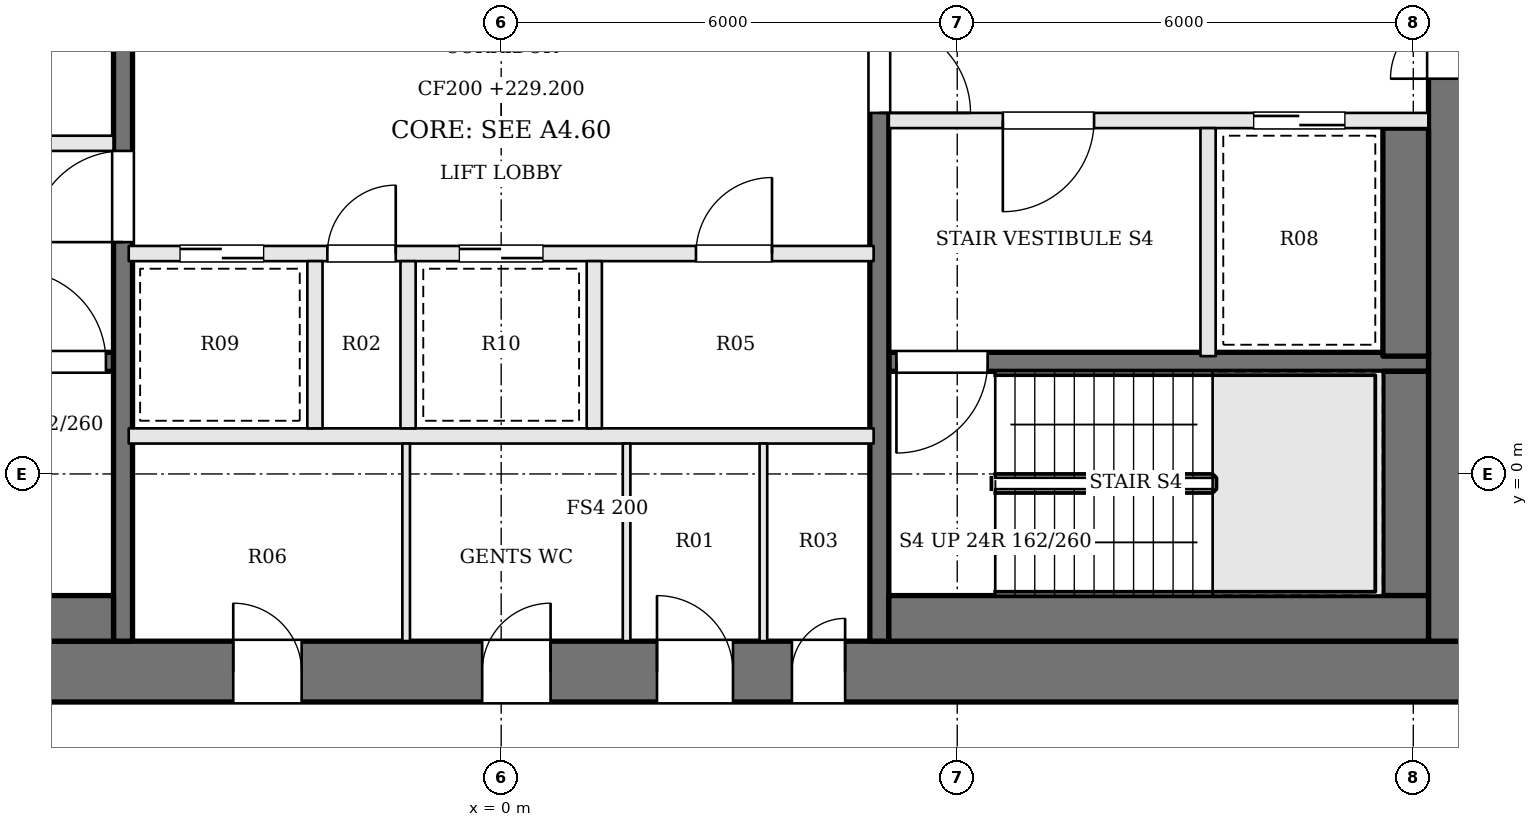
"""IFC4 building model, lengths in metres.
Left out: names, types, materials, properties, quantities, classifications, styles, units other than length and angle.
Written with IfcOpenShell. Run it as: python <this file> out.ifc"""

import sys

from ifc_helpers import new_model, si_unit, direction, frame, frame_2d, origin, place, context, subcontext, project, spatial, rectangle, extrude, element, fill, save


model = new_model("IFC4")
c1 = context("Model", 3, precision=1e-05, world=origin(), true_north=direction((0.0, 1.0)))
c2 = subcontext(c1, "Body", "Model", "MODEL_VIEW")
j1 = project(units=[si_unit("LENGTHUNIT", "METRE"), si_unit("PLANEANGLEUNIT", "RADIAN")], contexts=[c1])
p1 = place(None, origin())
s1 = spatial("IfcSite", under=j1, at=p1, CompositionType="ELEMENT")
p2 = place(p1, origin())
s2 = spatial("IfcBuilding", under=s1, at=p2, CompositionType="ELEMENT")
p3 = place(p2, frame((0.0, 0.0, 229.2)))
s3 = spatial("IfcBuildingStorey", under=s2, at=p3, CompositionType="ELEMENT", Elevation=229.2)
p4 = place(p3, frame((-13.0, -2.6, 0.0), z_axis=(0.0, 0.0, 1.0), x_axis=(1.0, 0.0, 0.0)))
e1 = element("IfcWall", 1, at=p4, inside=s3, PredefinedType="SHEAR", context=c2, shape_type="SweptSolid", body=[
    extrude(rectangle(XDim=26.0, YDim=0.8, at=frame_2d((13.0, 0.0))), origin(), (0.0, 0.0, 1.0), 3.9),
])
p5 = place(p4, frame((9.475, 0.0, 0.0)))
e2 = element("IfcOpeningElement", 2, at=p5, cuts=e1, PredefinedType="OPENING", context=c2, shape_type="SweptSolid", body=[
    extrude(rectangle(XDim=0.9, YDim=2.1, at=frame_2d((0.45, 1.05))), frame((0.0, 0.41, 0.0), z_axis=(0.0, -1.0, 0.0), x_axis=(1.0, 0.0, 0.0)), (0.0, 0.0, 1.0), 0.82),
])
p6 = place(p4, frame((12.75, 0.0, 0.0)))
e3 = element("IfcOpeningElement", 3, at=p6, cuts=e1, PredefinedType="OPENING", context=c2, shape_type="SweptSolid", body=[
    extrude(rectangle(XDim=0.9, YDim=2.1, at=frame_2d((0.45, 1.05))), frame((0.0, 0.41, 0.0), z_axis=(0.0, -1.0, 0.0), x_axis=(1.0, 0.0, 0.0)), (0.0, 0.0, 1.0), 0.82),
])
p7 = place(p4, frame((15.05, 0.0, 0.0)))
e4 = element("IfcOpeningElement", 4, at=p7, cuts=e1, PredefinedType="OPENING", context=c2, shape_type="SweptSolid", body=[
    extrude(rectangle(XDim=1.0, YDim=2.1, at=frame_2d((0.5, 1.05))), frame((0.0, 0.41, 0.0), z_axis=(0.0, -1.0, 0.0), x_axis=(1.0, 0.0, 0.0)), (0.0, 0.0, 1.0), 0.82),
])
p8 = place(p4, frame((16.825, 0.0, 0.0)))
e5 = element("IfcOpeningElement", 5, at=p8, cuts=e1, PredefinedType="OPENING", context=c2, shape_type="SweptSolid", body=[
    extrude(rectangle(XDim=0.7, YDim=2.1, at=frame_2d((0.35, 1.05))), frame((0.0, 0.41, 0.0), z_axis=(0.0, -1.0, 0.0), x_axis=(1.0, 0.0, 0.0)), (0.0, 0.0, 1.0), 0.82),
])
p9 = place(p3, frame((12.6, -2.2, 0.0), z_axis=(0.0, 0.0, 1.0), x_axis=(0.0, 1.0, 0.0)))
e6 = element("IfcWall", 6, at=p9, inside=s3, PredefinedType="SHEAR", context=c2, shape_type="SweptSolid", body=[
    extrude(rectangle(XDim=13.4, YDim=0.8, at=frame_2d((6.7, 0.0))), origin(), (0.0, 0.0, 1.0), 3.9),
])
p10 = place(p9, frame((7.4, 0.0, 0.0)))
e7 = element("IfcOpeningElement", 7, at=p10, cuts=e6, PredefinedType="OPENING", context=c2, shape_type="SweptSolid", body=[
    extrude(rectangle(XDim=1.8, YDim=2.1, at=frame_2d((0.9, 1.05))), frame((0.0, 0.41, 0.0), z_axis=(0.0, -1.0, 0.0), x_axis=(1.0, 0.0, 0.0)), (0.0, 0.0, 1.0), 0.82),
])
p11 = place(p3, frame((-12.2, 1.475, 0.0), z_axis=(0.0, 0.0, 1.0), x_axis=(1.0, 0.0, 0.0)))
e8 = element("IfcWall", 8, at=p11, inside=s3, PredefinedType="SOLIDWALL", context=c2, shape_type="SweptSolid", body=[
    extrude(rectangle(XDim=7.1, YDim=0.25, at=frame_2d((3.55, 0.0))), origin(), (0.0, 0.0, 1.0), 3.7),
])
p12 = place(p11, frame((5.8, 0.0, 0.0)))
e9 = element("IfcOpeningElement", 9, at=p12, cuts=e8, PredefinedType="OPENING", context=c2, shape_type="SweptSolid", body=[
    extrude(rectangle(XDim=1.2, YDim=2.1, at=frame_2d((0.6, 1.05))), frame((0.0, 0.135, 0.0), z_axis=(0.0, -1.0, 0.0), x_axis=(1.0, 0.0, 0.0)), (0.0, 0.0, 1.0), 0.27),
])
p13 = place(p3, frame((-12.2, 4.35, 0.0), z_axis=(0.0, 0.0, 1.0), x_axis=(1.0, 0.0, 0.0)))
e10 = element("IfcWall", 10, at=p13, inside=s3, PredefinedType="SOLIDWALL", context=c2, shape_type="SweptSolid", body=[
    extrude(rectangle(XDim=7.1, YDim=0.2, at=frame_2d((3.55, 0.0))), origin(), (0.0, 0.0, 1.0), 3.7),
])
p14 = place(p13, frame((4.4, 0.0, 0.0)))
e11 = element("IfcOpeningElement", 11, at=p14, cuts=e10, PredefinedType="OPENING", context=c2, shape_type="SweptSolid", body=[
    extrude(rectangle(XDim=1.2, YDim=2.1, at=frame_2d((0.6, 1.05))), frame((0.0, 0.11, 0.0), z_axis=(0.0, -1.0, 0.0), x_axis=(1.0, 0.0, 0.0)), (0.0, 0.0, 1.0), 0.22),
])
p15 = place(p13, frame((1.1, 0.0, 0.0)))
e12 = element("IfcOpeningElement", 12, at=p15, cuts=e10, PredefinedType="OPENING", context=c2, shape_type="SweptSolid", body=[
    extrude(rectangle(XDim=1.2, YDim=2.1, at=frame_2d((0.6, 1.05))), frame((0.0, 0.11, 0.0), z_axis=(0.0, -1.0, 0.0), x_axis=(1.0, 0.0, 0.0)), (0.0, 0.0, 1.0), 0.22),
])
p16 = place(p3, frame((12.2, 4.65, 0.0), z_axis=(0.0, 0.0, 1.0), x_axis=(-1.0, 0.0, 0.0)))
e13 = element("IfcWall", 13, at=p16, inside=s3, PredefinedType="SOLIDWALL", context=c2, shape_type="SweptSolid", body=[
    extrude(rectangle(XDim=7.1, YDim=0.2, at=frame_2d((3.55, 0.0))), origin(), (0.0, 0.0, 1.0), 3.7),
])
p17 = place(p16, frame((4.4, 0.0, 0.0)))
e14 = element("IfcOpeningElement", 14, at=p17, cuts=e13, PredefinedType="OPENING", context=c2, shape_type="SweptSolid", body=[
    extrude(rectangle(XDim=1.2, YDim=2.1, at=frame_2d((0.6, 1.05))), frame((0.0, 0.11, 0.0), z_axis=(0.0, -1.0, 0.0), x_axis=(1.0, 0.0, 0.0)), (0.0, 0.0, 1.0), 0.22),
])
p18 = place(p16, frame((1.1, 0.0, 0.0)))
e15 = element("IfcOpeningElement", 15, at=p18, cuts=e13, PredefinedType="OPENING", context=c2, shape_type="SweptSolid", body=[
    extrude(rectangle(XDim=1.2, YDim=2.1, at=frame_2d((0.6, 1.05))), frame((0.0, 0.11, 0.0), z_axis=(0.0, -1.0, 0.0), x_axis=(1.0, 0.0, 0.0)), (0.0, 0.0, 1.0), 0.22),
])
p19 = place(p3, frame((12.2, 1.475, 0.0), z_axis=(0.0, 0.0, 1.0), x_axis=(-1.0, 0.0, 0.0)))
e16 = element("IfcWall", 16, at=p19, inside=s3, PredefinedType="SOLIDWALL", context=c2, shape_type="SweptSolid", body=[
    extrude(rectangle(XDim=7.1, YDim=0.25, at=frame_2d((3.55, 0.0))), origin(), (0.0, 0.0, 1.0), 3.7),
])
p20 = place(p19, frame((5.8, 0.0, 0.0)))
e17 = element("IfcOpeningElement", 17, at=p20, cuts=e16, PredefinedType="OPENING", context=c2, shape_type="SweptSolid", body=[
    extrude(rectangle(XDim=1.2, YDim=2.1, at=frame_2d((0.6, 1.05))), frame((0.0, 0.135, 0.0), z_axis=(0.0, -1.0, 0.0), x_axis=(1.0, 0.0, 0.0)), (0.0, 0.0, 1.0), 0.27),
])
p21 = place(p3, frame((9.3, 4.55, 0.0), z_axis=(0.0, 0.0, 1.0), x_axis=(0.0, -1.0, 0.0)))
e18 = element("IfcWall", 18, at=p21, inside=s3, PredefinedType="SOLIDWALL", context=c2, shape_type="SweptSolid", body=[
    extrude(rectangle(XDim=3.0, YDim=0.2, at=frame_2d((1.5, 0.0))), origin(), (0.0, 0.0, 1.0), 3.7),
])
p22 = place(p3, frame((-4.975, -2.2, 0.0), z_axis=(0.0, 0.0, 1.0), x_axis=(0.0, 1.0, 0.0)))
e19 = element("IfcWall", 19, at=p22, inside=s3, PredefinedType="SOLIDWALL", context=c2, shape_type="SweptSolid", body=[
    extrude(rectangle(XDim=13.4, YDim=0.25, at=frame_2d((6.7, 0.0))), origin(), (0.0, 0.0, 1.0), 3.7),
])
p23 = place(p22, frame((5.25, 0.0, 0.0)))
e20 = element("IfcOpeningElement", 20, at=p23, cuts=e19, PredefinedType="OPENING", context=c2, shape_type="SweptSolid", body=[
    extrude(rectangle(XDim=1.2, YDim=2.1, at=frame_2d((0.6, 1.05))), frame((0.0, 0.135, 0.0), z_axis=(0.0, -1.0, 0.0), x_axis=(1.0, 0.0, 0.0)), (0.0, 0.0, 1.0), 0.27),
])
p24 = place(p3, frame((4.975, 11.2, 0.0), z_axis=(0.0, 0.0, 1.0), x_axis=(0.0, -1.0, 0.0)))
e21 = element("IfcWall", 21, at=p24, inside=s3, PredefinedType="SOLIDWALL", context=c2, shape_type="SweptSolid", body=[
    extrude(rectangle(XDim=13.4, YDim=0.25, at=frame_2d((6.7, 0.0))), origin(), (0.0, 0.0, 1.0), 3.7),
])
p25 = place(p24, frame((5.25, 0.0, 0.0)))
e22 = element("IfcOpeningElement", 22, at=p25, cuts=e21, PredefinedType="OPENING", context=c2, shape_type="SweptSolid", body=[
    extrude(rectangle(XDim=1.2, YDim=2.1, at=frame_2d((0.6, 1.05))), frame((0.0, 0.135, 0.0), z_axis=(0.0, -1.0, 0.0), x_axis=(1.0, 0.0, 0.0)), (0.0, 0.0, 1.0), 0.27),
])
p26 = place(p3, frame((-12.2, -1.9, 0.0), z_axis=(0.0, 0.0, 1.0), x_axis=(1.0, 0.0, 0.0)))
e23 = element("IfcWall", 23, at=p26, inside=s3, PredefinedType="SOLIDWALL", context=c2, shape_type="SweptSolid", body=[
    extrude(rectangle(XDim=7.1, YDim=0.6, at=frame_2d((3.55, 0.0))), origin(), (0.0, 0.0, 1.0), 3.7),
])
p27 = place(p3, frame((11.9, 4.55, 0.0), z_axis=(0.0, 0.0, 1.0), x_axis=(0.0, -1.0, 0.0)))
e24 = element("IfcWall", 24, at=p27, inside=s3, PredefinedType="SOLIDWALL", context=c2, shape_type="SweptSolid", body=[
    extrude(rectangle(XDim=3.0, YDim=0.6, at=frame_2d((1.5, 0.0))), origin(), (0.0, 0.0, 1.0), 3.7),
])
p28 = place(p3, frame((11.9, 1.35, 0.0), z_axis=(0.0, 0.0, 1.0), x_axis=(0.0, -1.0, 0.0)))
e25 = element("IfcWall", 25, at=p28, inside=s3, PredefinedType="SOLIDWALL", context=c2, shape_type="SweptSolid", body=[
    extrude(rectangle(XDim=2.95, YDim=0.6, at=frame_2d((1.475, 0.0))), origin(), (0.0, 0.0, 1.0), 3.7),
])
p29 = place(p3, frame((12.2, -1.9, 0.0), z_axis=(0.0, 0.0, 1.0), x_axis=(-1.0, 0.0, 0.0)))
e26 = element("IfcWall", 26, at=p29, inside=s3, PredefinedType="SOLIDWALL", context=c2, shape_type="SweptSolid", body=[
    extrude(rectangle(XDim=7.1, YDim=0.6, at=frame_2d((3.55, 0.0))), origin(), (0.0, 0.0, 1.0), 3.7),
])
p30 = place(p3, frame((-4.9, 0.5, 0.0), z_axis=(0.0, 0.0, 1.0), x_axis=(1.0, 0.0, 0.0)))
e27 = element("IfcWall", 27, at=p30, inside=s3, PredefinedType="SOLIDWALL", context=c2, shape_type="SweptSolid", body=[
    extrude(rectangle(XDim=9.8, YDim=0.2, at=frame_2d((4.9, 0.0))), origin(), (0.0, 0.0, 1.0), 3.7),
])
p31 = place(p3, frame((-4.9, 2.9, 0.0), z_axis=(0.0, 0.0, 1.0), x_axis=(1.0, 0.0, 0.0)))
e28 = element("IfcWall", 28, at=p31, inside=s3, PredefinedType="SOLIDWALL", context=c2, shape_type="SweptSolid", body=[
    extrude(rectangle(XDim=9.8, YDim=0.2, at=frame_2d((4.9, 0.0))), origin(), (0.0, 0.0, 1.0), 3.7),
])
p32 = place(p31, frame((0.675, 0.0, 0.0)))
e29 = element("IfcOpeningElement", 29, at=p32, cuts=e28, PredefinedType="OPENING", context=c2, shape_type="SweptSolid", body=[
    extrude(rectangle(XDim=1.1, YDim=2.1, at=frame_2d((0.55, 1.05))), frame((0.0, 0.11, 0.0), z_axis=(0.0, -1.0, 0.0), x_axis=(1.0, 0.0, 0.0)), (0.0, 0.0, 1.0), 0.22),
])
p33 = place(p31, frame((2.613, 0.0, 0.0)))
e30 = element("IfcOpeningElement", 30, at=p33, cuts=e28, PredefinedType="OPENING", context=c2, shape_type="SweptSolid", body=[
    extrude(rectangle(XDim=0.9, YDim=2.1, at=frame_2d((0.45, 1.05))), frame((0.0, 0.11, 0.0), z_axis=(0.0, -1.0, 0.0), x_axis=(1.0, 0.0, 0.0)), (0.0, 0.0, 1.0), 0.22),
])
p34 = place(p31, frame((4.35, 0.0, 0.0)))
e31 = element("IfcOpeningElement", 31, at=p34, cuts=e28, PredefinedType="OPENING", context=c2, shape_type="SweptSolid", body=[
    extrude(rectangle(XDim=1.1, YDim=2.1, at=frame_2d((0.55, 1.05))), frame((0.0, 0.11, 0.0), z_axis=(0.0, -1.0, 0.0), x_axis=(1.0, 0.0, 0.0)), (0.0, 0.0, 1.0), 0.22),
])
p35 = place(p31, frame((7.463, 0.0, 0.0)))
e32 = element("IfcOpeningElement", 32, at=p35, cuts=e28, PredefinedType="OPENING", context=c2, shape_type="SweptSolid", body=[
    extrude(rectangle(XDim=1.0, YDim=2.1, at=frame_2d((0.5, 1.05))), frame((0.0, 0.11, 0.0), z_axis=(0.0, -1.0, 0.0), x_axis=(1.0, 0.0, 0.0)), (0.0, 0.0, 1.0), 0.22),
])
for number, where, z_axis, x_axis in (
    (33, (-2.45, 0.6, 0.0), (0.0, 0.0, 1.0), (0.0, 1.0, 0.0)),
    (34, (-1.225, 0.6, 0.0), (0.0, 0.0, 1.0), (0.0, 1.0, 0.0)),
    (35, (1.225, 0.6, 0.0), (0.0, 0.0, 1.0), (0.0, 1.0, 0.0)),
):
    element("IfcWall", number, at=place(p3, frame(where, z_axis=z_axis, x_axis=x_axis)), inside=s3, PredefinedType="SOLIDWALL", context=c2, shape_type="SweptSolid", body=[
        extrude(rectangle(XDim=2.2, YDim=0.2, at=frame_2d((1.1, 0.0))), origin(), (0.0, 0.0, 1.0), 3.7),
    ])
for number, where, z_axis, x_axis in (
    (36, (-1.25, -2.2, 0.0), (0.0, 0.0, 1.0), (0.0, 1.0, 0.0)),
    (37, (1.65, -2.2, 0.0), (0.0, 0.0, 1.0), (0.0, 1.0, 0.0)),
    (38, (3.45, -2.2, 0.0), (0.0, 0.0, 1.0), (0.0, 1.0, 0.0)),
):
    element("IfcWall", number, at=place(p3, frame(where, z_axis=z_axis, x_axis=x_axis)), inside=s3, PredefinedType="PARTITIONING", context=c2, shape_type="SweptSolid", body=[
        extrude(rectangle(XDim=2.6, YDim=0.1, at=frame_2d((1.3, 0.0))), origin(), (0.0, 0.0, 1.0), 3.7),
    ])
p36 = place(p10, origin())
e39 = element("IfcDoor", 39, at=p36, inside=s3, OperationType="DOUBLE_DOOR_SINGLE_SWING", PredefinedType="DOOR", context=c2, shape_type="SweptSolid", body=[
    extrude(rectangle(XDim=1.8, YDim=2.1, at=frame_2d((0.9, 1.05))), frame((0.0, 0.025, 0.0), z_axis=(0.0, -1.0, 0.0), x_axis=(1.0, 0.0, 0.0)), (0.0, 0.0, 1.0), 0.05),
])
fill(e7, e39)
p37 = place(p23, origin())
e40 = element("IfcDoor", 40, at=p37, inside=s3, OperationType="SINGLE_SWING_LEFT", PredefinedType="DOOR", context=c2, shape_type="SweptSolid", body=[
    extrude(rectangle(XDim=1.2, YDim=2.1, at=frame_2d((0.6, 1.05))), frame((0.0, 0.025, 0.0), z_axis=(0.0, -1.0, 0.0), x_axis=(1.0, 0.0, 0.0)), (0.0, 0.0, 1.0), 0.05),
])
fill(e20, e40)
p38 = place(p25, origin())
e41 = element("IfcDoor", 41, at=p38, inside=s3, OperationType="SINGLE_SWING_RIGHT", PredefinedType="DOOR", context=c2, shape_type="SweptSolid", body=[
    extrude(rectangle(XDim=1.2, YDim=2.1, at=frame_2d((0.6, 1.05))), frame((0.0, 0.025, 0.0), z_axis=(0.0, -1.0, 0.0), x_axis=(1.0, 0.0, 0.0)), (0.0, 0.0, 1.0), 0.05),
])
fill(e22, e41)
p39 = place(p17, origin())
e42 = element("IfcDoor", 42, at=p39, inside=s3, OperationType="SINGLE_SWING_RIGHT", PredefinedType="DOOR", context=c2, shape_type="SweptSolid", body=[
    extrude(rectangle(XDim=1.2, YDim=2.1, at=frame_2d((0.6, 1.05))), frame((0.0, 0.025, 0.0), z_axis=(0.0, -1.0, 0.0), x_axis=(1.0, 0.0, 0.0)), (0.0, 0.0, 1.0), 0.05),
])
fill(e14, e42)
p40 = place(p12, origin())
e43 = element("IfcDoor", 43, at=p40, inside=s3, OperationType="SINGLE_SWING_LEFT", PredefinedType="DOOR", context=c2, shape_type="SweptSolid", body=[
    extrude(rectangle(XDim=1.2, YDim=2.1, at=frame_2d((0.6, 1.05))), frame((0.0, 0.025, 0.0), z_axis=(0.0, -1.0, 0.0), x_axis=(1.0, 0.0, 0.0)), (0.0, 0.0, 1.0), 0.05),
])
fill(e9, e43)
p41 = place(p20, origin())
e44 = element("IfcDoor", 44, at=p41, inside=s3, OperationType="SINGLE_SWING_RIGHT", PredefinedType="DOOR", context=c2, shape_type="SweptSolid", body=[
    extrude(rectangle(XDim=1.2, YDim=2.1, at=frame_2d((0.6, 1.05))), frame((0.0, 0.025, 0.0), z_axis=(0.0, -1.0, 0.0), x_axis=(1.0, 0.0, 0.0)), (0.0, 0.0, 1.0), 0.05),
])
fill(e17, e44)
p42 = place(p18, origin())
e45 = element("IfcDoor", 45, at=p42, inside=s3, OperationType="SLIDING_TO_RIGHT", PredefinedType="DOOR", context=c2, shape_type="SweptSolid", body=[
    extrude(rectangle(XDim=1.2, YDim=2.1, at=frame_2d((0.6, 1.05))), frame((0.0, 0.025, 0.0), z_axis=(0.0, -1.0, 0.0), x_axis=(1.0, 0.0, 0.0)), (0.0, 0.0, 1.0), 0.05),
])
fill(e15, e45)
p43 = place(p32, origin())
e46 = element("IfcDoor", 46, at=p43, inside=s3, OperationType="SLIDING_TO_RIGHT", PredefinedType="DOOR", context=c2, shape_type="SweptSolid", body=[
    extrude(rectangle(XDim=1.1, YDim=2.1, at=frame_2d((0.55, 1.05))), frame((0.0, 0.025, 0.0), z_axis=(0.0, -1.0, 0.0), x_axis=(1.0, 0.0, 0.0)), (0.0, 0.0, 1.0), 0.05),
])
fill(e29, e46)
p44 = place(p33, origin())
e47 = element("IfcDoor", 47, at=p44, inside=s3, OperationType="SINGLE_SWING_RIGHT", PredefinedType="DOOR", context=c2, shape_type="SweptSolid", body=[
    extrude(rectangle(XDim=0.9, YDim=2.1, at=frame_2d((0.45, 1.05))), frame((0.0, 0.025, 0.0), z_axis=(0.0, -1.0, 0.0), x_axis=(1.0, 0.0, 0.0)), (0.0, 0.0, 1.0), 0.05),
])
fill(e30, e47)
p45 = place(p34, origin())
e48 = element("IfcDoor", 48, at=p45, inside=s3, OperationType="SLIDING_TO_LEFT", PredefinedType="DOOR", context=c2, shape_type="SweptSolid", body=[
    extrude(rectangle(XDim=1.1, YDim=2.1, at=frame_2d((0.55, 1.05))), frame((0.0, 0.025, 0.0), z_axis=(0.0, -1.0, 0.0), x_axis=(1.0, 0.0, 0.0)), (0.0, 0.0, 1.0), 0.05),
])
fill(e31, e48)
p46 = place(p35, origin())
e49 = element("IfcDoor", 49, at=p46, inside=s3, OperationType="SINGLE_SWING_RIGHT", PredefinedType="DOOR", context=c2, shape_type="SweptSolid", body=[
    extrude(rectangle(XDim=1.0, YDim=2.1, at=frame_2d((0.5, 1.05))), frame((0.0, 0.025, 0.0), z_axis=(0.0, -1.0, 0.0), x_axis=(1.0, 0.0, 0.0)), (0.0, 0.0, 1.0), 0.05),
])
fill(e32, e49)
p47 = place(p5, origin())
e50 = element("IfcDoor", 50, at=p47, inside=s3, OperationType="SINGLE_SWING_LEFT", PredefinedType="DOOR", context=c2, shape_type="SweptSolid", body=[
    extrude(rectangle(XDim=0.9, YDim=2.1, at=frame_2d((0.45, 1.05))), frame((0.0, 0.025, 0.0), z_axis=(0.0, -1.0, 0.0), x_axis=(1.0, 0.0, 0.0)), (0.0, 0.0, 1.0), 0.05),
])
fill(e2, e50)
p48 = place(p6, origin())
e51 = element("IfcDoor", 51, at=p48, inside=s3, OperationType="SINGLE_SWING_RIGHT", PredefinedType="DOOR", context=c2, shape_type="SweptSolid", body=[
    extrude(rectangle(XDim=0.9, YDim=2.1, at=frame_2d((0.45, 1.05))), frame((0.0, 0.025, 0.0), z_axis=(0.0, -1.0, 0.0), x_axis=(1.0, 0.0, 0.0)), (0.0, 0.0, 1.0), 0.05),
])
fill(e3, e51)
p49 = place(p7, origin())
e52 = element("IfcDoor", 52, at=p49, inside=s3, OperationType="SINGLE_SWING_LEFT", PredefinedType="DOOR", context=c2, shape_type="SweptSolid", body=[
    extrude(rectangle(XDim=1.0, YDim=2.1, at=frame_2d((0.5, 1.05))), frame((0.0, 0.025, 0.0), z_axis=(0.0, -1.0, 0.0), x_axis=(1.0, 0.0, 0.0)), (0.0, 0.0, 1.0), 0.05),
])
fill(e4, e52)
p50 = place(p8, origin())
e53 = element("IfcDoor", 53, at=p50, inside=s3, OperationType="SINGLE_SWING_RIGHT", PredefinedType="DOOR", context=c2, shape_type="SweptSolid", body=[
    extrude(rectangle(XDim=0.7, YDim=2.1, at=frame_2d((0.35, 1.05))), frame((0.0, 0.025, 0.0), z_axis=(0.0, -1.0, 0.0), x_axis=(1.0, 0.0, 0.0)), (0.0, 0.0, 1.0), 0.05),
])
fill(e5, e53)
save(model, sys.argv[1])
